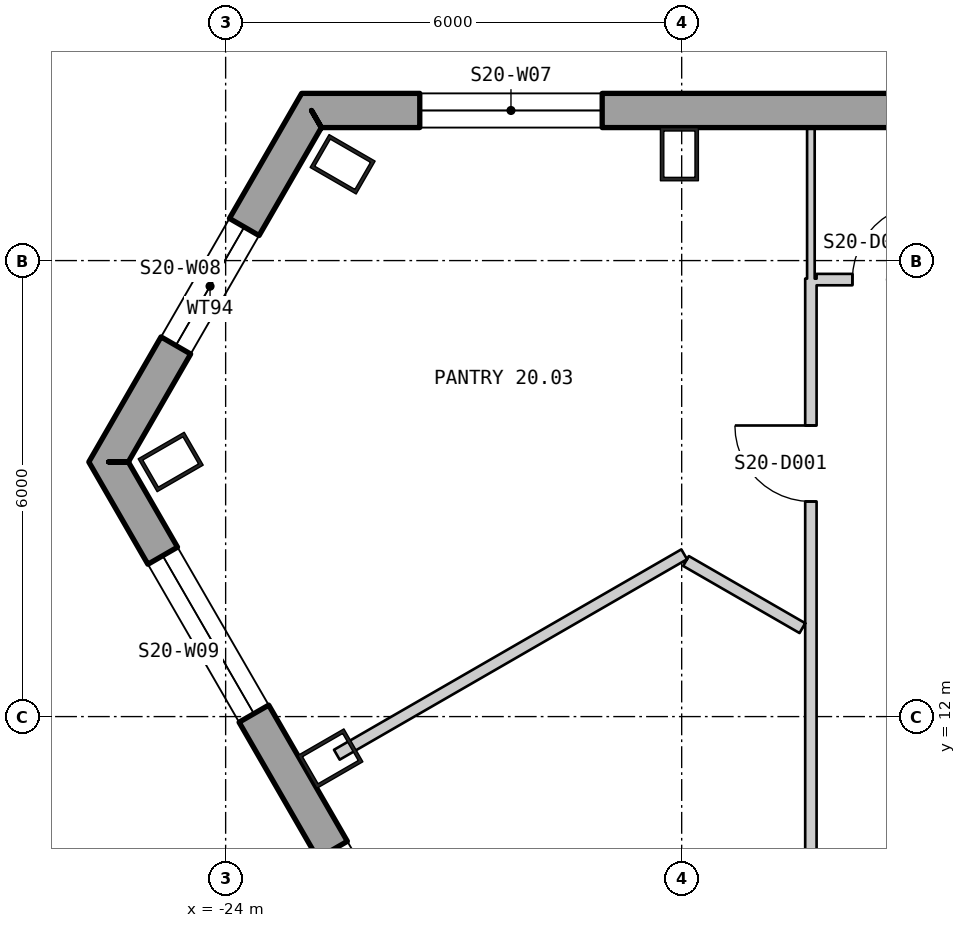
"""IFC4 building model, lengths in metres.
Left out: names, types, materials, properties, quantities, classifications, styles, units other than length and angle.
Written with IfcOpenShell. Run it as: python <this file> out.ifc"""

import sys

from ifc_helpers import new_model, si_unit, direction, frame, frame_2d, origin, origin_2d, place, context, subcontext, project, spatial, polyline, rectangle, hollow_rectangle, outline, extrude, element, fill, save


model = new_model("IFC4")
c1 = context("Model", 3, precision=1e-05, world=origin(), true_north=direction((0.0, 1.0)))
c2 = subcontext(c1, "Body", "Model", "MODEL_VIEW")
j1 = project(units=[si_unit("LENGTHUNIT", "METRE"), si_unit("PLANEANGLEUNIT", "RADIAN")], contexts=[c1])
p1 = place(None, origin())
s1 = spatial("IfcSite", under=j1, at=p1, CompositionType="ELEMENT")
p2 = place(p1, origin())
s2 = spatial("IfcBuilding", under=s1, at=p2, CompositionType="ELEMENT")
p3 = place(p2, frame((0.0, 0.0, 268.8)))
s3 = spatial("IfcBuildingStorey", under=s2, at=p3, CompositionType="ELEMENT", Elevation=268.8)
for number, where, z_axis, x_axis in (
    (1, (-18.03, 19.4, 0.0), (0.0, 0.0, 1.0), (-1.0, 0.0, 0.0)),
    (2, (-22.461, 19.267, 0.0), (0.0, 0.0, 1.0), (-0.5, -0.866, 0.0)),
    (3, (-24.723, 15.35, 0.0), (0.0, 0.0, 1.0), (0.5, -0.866, 0.0)),
    (4, (-22.622, 11.447, 0.0), (0.0, 0.0, 1.0), (0.5, -0.866, 0.0)),
):
    element("IfcColumn", number, at=place(p3, frame(where, z_axis=z_axis, x_axis=x_axis)), inside=s3, PredefinedType="COLUMN", context=c2, shape_type="SweptSolid", body=[
        extrude(hollow_rectangle(XDim=0.5, YDim=0.7, WallThickness=0.045, at=origin_2d()), origin(), (0.0, 0.0, 1.0), 3.9),
    ])
p4 = place(p3, frame((22.87, 19.975, -0.4), z_axis=(0.0, 0.0, 1.0), x_axis=(-1.0, 0.0, 0.0)))
e5 = element("IfcWall", 5, at=p4, inside=s3, PredefinedType="SOLIDWALL", context=c2, shape_type="SweptSolid", body=[
    extrude(outline(polyline([(-0.13, -0.225), (45.87, -0.225), (45.61, 0.225), (0.13, 0.225), (-0.13, -0.225)])), origin(), (0.0, 0.0, 1.0), 3.9),
])
p5 = place(p4, frame((1.424, 0.0, 1.3)))
e6 = element("IfcOpeningElement", 6, at=p5, cuts=e5, PredefinedType="OPENING", context=c2, shape_type="SweptSolid", body=[
    extrude(rectangle(XDim=2.4, YDim=2.0, at=frame_2d((1.2, 1.0))), frame((0.0, 0.235, 0.0), z_axis=(0.0, -1.0, 0.0), x_axis=(1.0, 0.0, 0.0)), (0.0, 0.0, 1.0), 0.47),
])
p6 = place(p4, frame((14.909, 0.0, 1.3)))
e7 = element("IfcOpeningElement", 7, at=p6, cuts=e5, PredefinedType="OPENING", context=c2, shape_type="SweptSolid", body=[
    extrude(rectangle(XDim=2.4, YDim=2.0, at=frame_2d((1.2, 1.0))), frame((0.0, 0.235, 0.0), z_axis=(0.0, -1.0, 0.0), x_axis=(1.0, 0.0, 0.0)), (0.0, 0.0, 1.0), 0.47),
])
p7 = place(p4, frame((19.416, 0.0, 1.3)))
e8 = element("IfcOpeningElement", 8, at=p7, cuts=e5, PredefinedType="OPENING", context=c2, shape_type="SweptSolid", body=[
    extrude(rectangle(XDim=2.4, YDim=2.0, at=frame_2d((1.2, 1.0))), frame((0.0, 0.235, 0.0), z_axis=(0.0, -1.0, 0.0), x_axis=(1.0, 0.0, 0.0)), (0.0, 0.0, 1.0), 0.47),
])
p8 = place(p4, frame((23.924, 0.0, 1.3)))
e9 = element("IfcOpeningElement", 9, at=p8, cuts=e5, PredefinedType="OPENING", context=c2, shape_type="SweptSolid", body=[
    extrude(rectangle(XDim=2.4, YDim=2.0, at=frame_2d((1.2, 1.0))), frame((0.0, 0.235, 0.0), z_axis=(0.0, -1.0, 0.0), x_axis=(1.0, 0.0, 0.0)), (0.0, 0.0, 1.0), 0.47),
])
p9 = place(p4, frame((28.431, 0.0, 1.3)))
e10 = element("IfcOpeningElement", 10, at=p9, cuts=e5, PredefinedType="OPENING", context=c2, shape_type="SweptSolid", body=[
    extrude(rectangle(XDim=2.4, YDim=2.0, at=frame_2d((1.2, 1.0))), frame((0.0, 0.235, 0.0), z_axis=(0.0, -1.0, 0.0), x_axis=(1.0, 0.0, 0.0)), (0.0, 0.0, 1.0), 0.47),
])
p10 = place(p4, frame((32.939, 0.0, 1.3)))
e11 = element("IfcOpeningElement", 11, at=p10, cuts=e5, PredefinedType="OPENING", context=c2, shape_type="SweptSolid", body=[
    extrude(rectangle(XDim=2.4, YDim=2.0, at=frame_2d((1.2, 1.0))), frame((0.0, 0.235, 0.0), z_axis=(0.0, -1.0, 0.0), x_axis=(1.0, 0.0, 0.0)), (0.0, 0.0, 1.0), 0.47),
])
p11 = place(p4, frame((41.916, 0.0, 1.3)))
e12 = element("IfcOpeningElement", 12, at=p11, cuts=e5, PredefinedType="OPENING", context=c2, shape_type="SweptSolid", body=[
    extrude(rectangle(XDim=2.4, YDim=2.0, at=frame_2d((1.2, 1.0))), frame((0.0, 0.235, 0.0), z_axis=(0.0, -1.0, 0.0), x_axis=(1.0, 0.0, 0.0)), (0.0, 0.0, 1.0), 0.47),
])
p12 = place(p3, frame((-22.87, 19.975, -0.4), z_axis=(0.0, 0.0, 1.0), x_axis=(-0.500003961967, -0.866023116329, 0.0)))
e13 = element("IfcWall", 13, at=p12, inside=s3, PredefinedType="SOLIDWALL", context=c2, shape_type="SweptSolid", body=[
    extrude(outline(polyline([(-0.13, -0.225), (5.47, -0.225), (5.21, 0.225), (0.13, 0.225), (-0.13, -0.225)])), origin(), (0.0, 0.0, 1.0), 3.9),
])
p13 = place(p12, frame((1.77, 0.0, 1.3)))
e14 = element("IfcOpeningElement", 14, at=p13, cuts=e13, PredefinedType="OPENING", context=c2, shape_type="SweptSolid", body=[
    extrude(rectangle(XDim=1.8, YDim=2.0, at=frame_2d((0.9, 1.0))), frame((0.0, 0.235, 0.0), z_axis=(0.0, -1.0, 0.0), x_axis=(1.0, 0.0, 0.0)), (0.0, 0.0, 1.0), 0.47),
])
p14 = place(p3, frame((-25.54, 15.35, -0.18), z_axis=(0.0, 0.0, 1.0), x_axis=(0.499999764979, -0.866025539474, 0.0)))
e15 = element("IfcWall", 15, at=p14, inside=s3, PredefinedType="SOLIDWALL", context=c2, shape_type="SweptSolid", body=[
    extrude(outline(polyline([(-0.13, -0.225), (45.87, -0.225), (45.61, 0.225), (0.13, 0.225), (-0.13, -0.225)])), origin(), (0.0, 0.0, 1.0), 3.68),
])
p15 = place(p14, frame((1.424, 0.0, 1.08)))
e16 = element("IfcOpeningElement", 16, at=p15, cuts=e15, PredefinedType="OPENING", context=c2, shape_type="SweptSolid", body=[
    extrude(rectangle(XDim=2.4, YDim=2.0, at=frame_2d((1.2, 1.0))), frame((0.0, 0.235, 0.0), z_axis=(0.0, -1.0, 0.0), x_axis=(1.0, 0.0, 0.0)), (0.0, 0.0, 1.0), 0.47),
])
p16 = place(p14, frame((5.893, 0.0, 1.08)))
e17 = element("IfcOpeningElement", 17, at=p16, cuts=e15, PredefinedType="OPENING", context=c2, shape_type="SweptSolid", body=[
    extrude(rectangle(XDim=2.4, YDim=2.0, at=frame_2d((1.2, 1.0))), frame((0.0, 0.235, 0.0), z_axis=(0.0, -1.0, 0.0), x_axis=(1.0, 0.0, 0.0)), (0.0, 0.0, 1.0), 0.47),
])
p17 = place(p14, frame((10.401, 0.0, 1.08)))
e18 = element("IfcOpeningElement", 18, at=p17, cuts=e15, PredefinedType="OPENING", context=c2, shape_type="SweptSolid", body=[
    extrude(rectangle(XDim=2.4, YDim=2.0, at=frame_2d((1.2, 1.0))), frame((0.0, 0.235, 0.0), z_axis=(0.0, -1.0, 0.0), x_axis=(1.0, 0.0, 0.0)), (0.0, 0.0, 1.0), 0.47),
])
p18 = place(p14, frame((14.909, 0.0, 1.08)))
e19 = element("IfcOpeningElement", 19, at=p18, cuts=e15, PredefinedType="OPENING", context=c2, shape_type="SweptSolid", body=[
    extrude(rectangle(XDim=2.4, YDim=2.0, at=frame_2d((1.2, 1.0))), frame((0.0, 0.235, 0.0), z_axis=(0.0, -1.0, 0.0), x_axis=(1.0, 0.0, 0.0)), (0.0, 0.0, 1.0), 0.47),
])
p19 = place(p14, frame((19.416, 0.0, 1.08)))
e20 = element("IfcOpeningElement", 20, at=p19, cuts=e15, PredefinedType="OPENING", context=c2, shape_type="SweptSolid", body=[
    extrude(rectangle(XDim=2.4, YDim=2.0, at=frame_2d((1.2, 1.0))), frame((0.0, 0.235, 0.0), z_axis=(0.0, -1.0, 0.0), x_axis=(1.0, 0.0, 0.0)), (0.0, 0.0, 1.0), 0.47),
])
p20 = place(p14, frame((23.924, 0.0, 1.08)))
e21 = element("IfcOpeningElement", 21, at=p20, cuts=e15, PredefinedType="OPENING", context=c2, shape_type="SweptSolid", body=[
    extrude(rectangle(XDim=2.4, YDim=2.0, at=frame_2d((1.2, 1.0))), frame((0.0, 0.235, 0.0), z_axis=(0.0, -1.0, 0.0), x_axis=(1.0, 0.0, 0.0)), (0.0, 0.0, 1.0), 0.47),
])
p21 = place(p14, frame((28.431, 0.0, 1.08)))
e22 = element("IfcOpeningElement", 22, at=p21, cuts=e15, PredefinedType="OPENING", context=c2, shape_type="SweptSolid", body=[
    extrude(rectangle(XDim=2.4, YDim=2.0, at=frame_2d((1.2, 1.0))), frame((0.0, 0.235, 0.0), z_axis=(0.0, -1.0, 0.0), x_axis=(1.0, 0.0, 0.0)), (0.0, 0.0, 1.0), 0.47),
])
p22 = place(p14, frame((32.939, 0.0, 1.08)))
e23 = element("IfcOpeningElement", 23, at=p22, cuts=e15, PredefinedType="OPENING", context=c2, shape_type="SweptSolid", body=[
    extrude(rectangle(XDim=2.4, YDim=2.0, at=frame_2d((1.2, 1.0))), frame((0.0, 0.235, 0.0), z_axis=(0.0, -1.0, 0.0), x_axis=(1.0, 0.0, 0.0)), (0.0, 0.0, 1.0), 0.47),
])
p23 = place(p14, frame((37.447, 0.0, 1.08)))
e24 = element("IfcOpeningElement", 24, at=p23, cuts=e15, PredefinedType="OPENING", context=c2, shape_type="SweptSolid", body=[
    extrude(rectangle(XDim=2.4, YDim=2.0, at=frame_2d((1.2, 1.0))), frame((0.0, 0.235, 0.0), z_axis=(0.0, -1.0, 0.0), x_axis=(1.0, 0.0, 0.0)), (0.0, 0.0, 1.0), 0.47),
])
p24 = place(p14, frame((41.916, 0.0, 1.08)))
e25 = element("IfcOpeningElement", 25, at=p24, cuts=e15, PredefinedType="OPENING", context=c2, shape_type="SweptSolid", body=[
    extrude(rectangle(XDim=2.4, YDim=2.0, at=frame_2d((1.2, 1.0))), frame((0.0, 0.235, 0.0), z_axis=(0.0, -1.0, 0.0), x_axis=(1.0, 0.0, 0.0)), (0.0, 0.0, 1.0), 0.47),
])
p25 = place(p3, frame((-22.537, 11.498, 0.0), z_axis=(0.0, 0.0, 1.0), x_axis=(0.866147719825, 0.499788082533, 0.0)))
e26 = element("IfcWall", 26, at=p25, inside=s3, PredefinedType="PARTITIONING", context=c2, shape_type="SweptSolid", body=[
    extrude(rectangle(XDim=5.276, YDim=0.15, at=frame_2d((2.638, 0.0))), origin(), (0.0, 0.0, 1.0), 3.7),
])
p26 = place(p3, frame((-17.943, 14.047, 0.0), z_axis=(0.0, 0.0, 1.0), x_axis=(0.866251516137, -0.49960815725, 0.0)))
e27 = element("IfcWall", 27, at=p26, inside=s3, PredefinedType="PARTITIONING", context=c2, shape_type="SweptSolid", body=[
    extrude(rectangle(XDim=1.767, YDim=0.15, at=frame_2d((0.884, 0.0))), origin(), (0.0, 0.0, 1.0), 3.7),
])
p27 = place(p3, frame((-16.3, 2.125, 0.0), z_axis=(0.0, 0.0, 1.0), x_axis=(0.0, 1.0, 0.0)))
e28 = element("IfcWall", 28, at=p27, inside=s3, PredefinedType="PARTITIONING", context=c2, shape_type="SweptSolid", body=[
    extrude(rectangle(XDim=15.637, YDim=0.15, at=frame_2d((7.819, 0.0))), origin(), (0.0, 0.0, 1.0), 3.7),
])
p28 = place(p27, frame((12.705, 0.0, 0.0)))
e29 = element("IfcOpeningElement", 29, at=p28, cuts=e28, PredefinedType="OPENING", context=c2, shape_type="SweptSolid", body=[
    extrude(rectangle(XDim=1.0, YDim=2.1, at=frame_2d((0.5, 1.05))), frame((0.0, 0.085, 0.0), z_axis=(0.0, -1.0, 0.0), x_axis=(1.0, 0.0, 0.0)), (0.0, 0.0, 1.0), 0.17),
])
p29 = place(p3, frame((-16.3, 17.762, 0.0), z_axis=(0.0, 0.0, 1.0), x_axis=(0.0, 1.0, 0.0)))
e30 = element("IfcWall", 30, at=p29, inside=s3, PredefinedType="PARTITIONING", context=c2, shape_type="SweptSolid", body=[
    extrude(rectangle(XDim=1.988, YDim=0.1, at=frame_2d((0.994, 0.0))), origin(), (0.0, 0.0, 1.0), 3.7),
])
p30 = place(p3, frame((-16.225, 17.75, 0.0), z_axis=(0.0, 0.0, 1.0), x_axis=(1.0, 0.0, 0.0)))
e31 = element("IfcWall", 31, at=p30, inside=s3, PredefinedType="PARTITIONING", context=c2, shape_type="SweptSolid", body=[
    extrude(rectangle(XDim=1.725, YDim=0.15, at=frame_2d((0.863, 0.0))), origin(), (0.0, 0.0, 1.0), 3.7),
])
p31 = place(p30, frame((0.471, 0.0, 0.0)))
e32 = element("IfcOpeningElement", 32, at=p31, cuts=e31, PredefinedType="OPENING", context=c2, shape_type="SweptSolid", body=[
    extrude(rectangle(XDim=1.0, YDim=2.1, at=frame_2d((0.5, 1.05))), frame((0.0, 0.085, 0.0), z_axis=(0.0, -1.0, 0.0), x_axis=(1.0, 0.0, 0.0)), (0.0, 0.0, 1.0), 0.17),
])
p32 = place(p11, origin())
e33 = element("IfcWindow", 33, at=p32, inside=s3, PartitioningType="SINGLE_PANEL", PredefinedType="WINDOW", context=c2, shape_type="SweptSolid", body=[
    extrude(rectangle(XDim=2.4, YDim=2.0, at=frame_2d((1.2, 1.0))), frame((0.0, 0.105, 0.0), z_axis=(0.0, -1.0, 0.0), x_axis=(1.0, 0.0, 0.0)), (0.0, 0.0, 1.0), 0.06),
])
fill(e12, e33)
p33 = place(p13, origin())
e34 = element("IfcWindow", 34, at=p33, inside=s3, PartitioningType="SINGLE_PANEL", PredefinedType="WINDOW", context=c2, shape_type="SweptSolid", body=[
    extrude(rectangle(XDim=1.8, YDim=2.0, at=frame_2d((0.9, 1.0))), frame((0.0, 0.105, 0.0), z_axis=(0.0, -1.0, 0.0), x_axis=(1.0, 0.0, 0.0)), (0.0, 0.0, 1.0), 0.06),
])
fill(e14, e34)
p34 = place(p15, origin())
e35 = element("IfcWindow", 35, at=p34, inside=s3, PartitioningType="SINGLE_PANEL", PredefinedType="WINDOW", context=c2, shape_type="SweptSolid", body=[
    extrude(rectangle(XDim=2.4, YDim=2.0, at=frame_2d((1.2, 1.0))), frame((0.0, 0.105, 0.0), z_axis=(0.0, -1.0, 0.0), x_axis=(1.0, 0.0, 0.0)), (0.0, 0.0, 1.0), 0.06),
])
fill(e16, e35)
p35 = place(p16, origin())
e36 = element("IfcWindow", 36, at=p35, inside=s3, PartitioningType="SINGLE_PANEL", PredefinedType="WINDOW", context=c2, shape_type="SweptSolid", body=[
    extrude(rectangle(XDim=2.4, YDim=2.0, at=frame_2d((1.2, 1.0))), frame((0.0, 0.105, 0.0), z_axis=(0.0, -1.0, 0.0), x_axis=(1.0, 0.0, 0.0)), (0.0, 0.0, 1.0), 0.06),
])
fill(e17, e36)
p36 = place(p28, origin())
e37 = element("IfcDoor", 37, at=p36, inside=s3, OperationType="SINGLE_SWING_LEFT", PredefinedType="DOOR", context=c2, shape_type="SweptSolid", body=[
    extrude(rectangle(XDim=1.0, YDim=2.1, at=frame_2d((0.5, 1.05))), frame((0.0, 0.025, 0.0), z_axis=(0.0, -1.0, 0.0), x_axis=(1.0, 0.0, 0.0)), (0.0, 0.0, 1.0), 0.05),
])
fill(e29, e37)
p37 = place(p31, origin())
e38 = element("IfcDoor", 38, at=p37, inside=s3, OperationType="SINGLE_SWING_LEFT", PredefinedType="DOOR", context=c2, shape_type="SweptSolid", body=[
    extrude(rectangle(XDim=1.0, YDim=2.1, at=frame_2d((0.5, 1.05))), frame((0.0, 0.025, 0.0), z_axis=(0.0, -1.0, 0.0), x_axis=(1.0, 0.0, 0.0)), (0.0, 0.0, 1.0), 0.05),
])
fill(e32, e38)
save(model, sys.argv[1])
